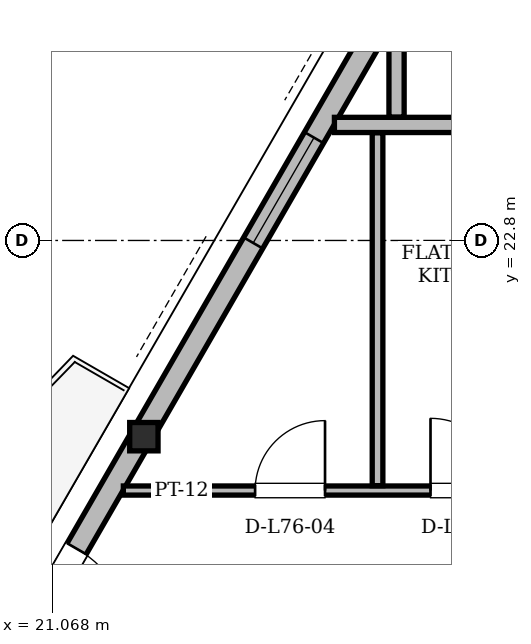
"""IFC4 building model, lengths in metres.
Left out: names, types, materials, properties, quantities, classifications, styles, units other than length and angle.
Written with IfcOpenShell. Run it as: python <this file> out.ifc"""

import sys

from ifc_helpers import new_model, si_unit, direction, frame, frame_2d, origin, origin_2d, place, context, subcontext, project, spatial, rectangle, i_section, extrude, element, fill, save


model = new_model("IFC4")
c1 = context("Model", 3, precision=1e-05, world=origin(), true_north=direction((0.0, 1.0)))
c2 = subcontext(c1, "Body", "Model", "MODEL_VIEW")
j1 = project(units=[si_unit("LENGTHUNIT", "METRE"), si_unit("PLANEANGLEUNIT", "RADIAN")], contexts=[c1])
p1 = place(None, origin())
s1 = spatial("IfcSite", under=j1, at=p1, CompositionType="ELEMENT")
p2 = place(p1, origin())
s2 = spatial("IfcBuilding", under=s1, at=p2, CompositionType="ELEMENT")
p3 = place(p2, frame((0.0, 0.0, 288.9)))
s3 = spatial("IfcBuildingStorey", under=s2, at=p3, CompositionType="ELEMENT", Elevation=288.9)
p4 = place(p3, frame((22.253, 20.237, 0.005), z_axis=(0.01160691126, -0.00941100913, 0.999888350026), x_axis=(0.629801958421, 0.77675574872, 0.0)))
e1 = element("IfcColumn", 1, at=p4, inside=s3, PredefinedType="COLUMN", context=c2, shape_type="SweptSolid", body=[
    extrude(i_section(OverallWidth=0.373, OverallDepth=0.373, WebThickness=0.016, FlangeThickness=0.026, at=origin_2d()), origin(), (0.0, 0.0, 1.0), 3.891),
])
p5 = place(p3, frame((35.387, 42.986, 0.0), z_axis=(0.0, 0.0, 1.0), x_axis=(-0.499995967686, -0.86602773183, 0.0)))
e2 = element("IfcWall", 2, at=p5, inside=s3, PredefinedType="SOLIDWALL", context=c2, shape_type="SweptSolid", body=[
    extrude(rectangle(XDim=37.526, YDim=0.29, at=frame_2d((18.763, 0.0))), origin(), (0.0, 0.0, 1.0), 3.058),
])
p6 = place(p5, frame((3.74, 0.0, 0.0)))
e3 = element("IfcOpeningElement", 3, at=p6, cuts=e2, PredefinedType="OPENING", context=c2, shape_type="SweptSolid", body=[
    extrude(rectangle(XDim=1.3, YDim=2.2, at=frame_2d((0.65, 1.1))), frame((0.0, 0.145, 0.0), z_axis=(0.0, -1.0, 0.0), x_axis=(1.0, 0.0, 0.0)), (0.0, 0.0, 1.0), 0.29),
])
p7 = place(p5, frame((27.991, 0.0, 0.0)))
e4 = element("IfcOpeningElement", 4, at=p7, cuts=e2, PredefinedType="OPENING", context=c2, shape_type="SweptSolid", body=[
    extrude(rectangle(XDim=1.5, YDim=2.2, at=frame_2d((0.75, 1.1))), frame((0.0, 0.145, 0.0), z_axis=(0.0, -1.0, 0.0), x_axis=(1.0, 0.0, 0.0)), (0.0, 0.0, 1.0), 0.29),
])
p8 = place(p5, frame((35.454, 0.0, 0.85)))
e5 = element("IfcOpeningElement", 5, at=p8, cuts=e2, PredefinedType="OPENING", context=c2, shape_type="SweptSolid", body=[
    extrude(rectangle(XDim=1.2, YDim=1.48, at=frame_2d((0.6, 0.74))), frame((0.0, 0.145, 0.0), z_axis=(0.0, -1.0, 0.0), x_axis=(1.0, 0.0, 0.0)), (0.0, 0.0, 1.0), 0.29),
])
p9 = place(p5, frame((33.674, 0.0, 0.85)))
e6 = element("IfcOpeningElement", 6, at=p9, cuts=e2, PredefinedType="OPENING", context=c2, shape_type="SweptSolid", body=[
    extrude(rectangle(XDim=1.2, YDim=1.48, at=frame_2d((0.6, 0.74))), frame((0.0, 0.145, 0.0), z_axis=(0.0, -1.0, 0.0), x_axis=(1.0, 0.0, 0.0)), (0.0, 0.0, 1.0), 0.29),
])
p10 = place(p5, frame((21.746, 0.0, 0.85)))
e7 = element("IfcOpeningElement", 7, at=p10, cuts=e2, PredefinedType="OPENING", context=c2, shape_type="SweptSolid", body=[
    extrude(rectangle(XDim=1.6, YDim=1.7, at=frame_2d((0.8, 0.85))), frame((0.0, 0.145, 0.0), z_axis=(0.0, -1.0, 0.0), x_axis=(1.0, 0.0, 0.0)), (0.0, 0.0, 1.0), 0.29),
])
p11 = place(p5, frame((8.642, 0.0, 0.85)))
e8 = element("IfcOpeningElement", 8, at=p11, cuts=e2, PredefinedType="OPENING", context=c2, shape_type="SweptSolid", body=[
    extrude(rectangle(XDim=1.2, YDim=1.48, at=frame_2d((0.6, 0.74))), frame((0.0, 0.145, 0.0), z_axis=(0.0, -1.0, 0.0), x_axis=(1.0, 0.0, 0.0)), (0.0, 0.0, 1.0), 0.29),
])
p12 = place(p5, frame((16.523, 0.0, 0.85)))
e9 = element("IfcOpeningElement", 9, at=p12, cuts=e2, PredefinedType="OPENING", context=c2, shape_type="SweptSolid", body=[
    extrude(rectangle(XDim=1.8, YDim=1.75, at=frame_2d((0.9, 0.875))), frame((0.0, 0.145, 0.0), z_axis=(0.0, -1.0, 0.0), x_axis=(1.0, 0.0, 0.0)), (0.0, 0.0, 1.0), 0.29),
])
p13 = place(p5, frame((6.715, 0.0, 0.85)))
e10 = element("IfcOpeningElement", 10, at=p13, cuts=e2, PredefinedType="OPENING", context=c2, shape_type="SweptSolid", body=[
    extrude(rectangle(XDim=1.2, YDim=1.48, at=frame_2d((0.6, 0.74))), frame((0.0, 0.145, 0.0), z_axis=(0.0, -1.0, 0.0), x_axis=(1.0, 0.0, 0.0)), (0.0, 0.0, 1.0), 0.29),
])
p14 = place(p5, frame((1.125, 0.0, 0.85)))
e11 = element("IfcOpeningElement", 11, at=p14, cuts=e2, PredefinedType="OPENING", context=c2, shape_type="SweptSolid", body=[
    extrude(rectangle(XDim=1.2, YDim=1.48, at=frame_2d((0.6, 0.74))), frame((0.0, 0.145, 0.0), z_axis=(0.0, -1.0, 0.0), x_axis=(1.0, 0.0, 0.0)), (0.0, 0.0, 1.0), 0.29),
])
p15 = place(p3, frame((22.006, 19.51, 0.0), z_axis=(0.0, 0.0, 1.0), x_axis=(1.0, 0.0, 0.0)))
e12 = element("IfcWall", 12, at=p15, inside=s3, PredefinedType="PARTITIONING", context=c2, shape_type="SweptSolid", body=[
    extrude(rectangle(XDim=7.63, YDim=0.12, at=frame_2d((3.815, 0.0))), origin(), (0.0, 0.0, 1.0), 2.82),
])
p16 = place(p15, frame((1.734, 0.0, 0.0)))
e13 = element("IfcOpeningElement", 13, at=p16, cuts=e12, PredefinedType="OPENING", context=c2, shape_type="SweptSolid", body=[
    extrude(rectangle(XDim=0.92, YDim=2.12, at=frame_2d((0.46, 1.06))), frame((0.0, 0.06, 0.0), z_axis=(0.0, -1.0, 0.0), x_axis=(1.0, 0.0, 0.0)), (0.0, 0.0, 1.0), 0.12),
])
p17 = place(p15, frame((4.042, 0.0, 0.0)))
e14 = element("IfcOpeningElement", 14, at=p17, cuts=e12, PredefinedType="OPENING", context=c2, shape_type="SweptSolid", body=[
    extrude(rectangle(XDim=0.95, YDim=2.1, at=frame_2d((0.475, 1.05))), frame((0.0, 0.06, 0.0), z_axis=(0.0, -1.0, 0.0), x_axis=(1.0, 0.0, 0.0)), (0.0, 0.0, 1.0), 0.12),
])
p18 = place(p15, frame((6.205, 0.0, 0.0)))
e15 = element("IfcOpeningElement", 15, at=p18, cuts=e12, PredefinedType="OPENING", context=c2, shape_type="SweptSolid", body=[
    extrude(rectangle(XDim=0.88, YDim=2.08, at=frame_2d((0.44, 1.04))), frame((0.0, 0.06, 0.0), z_axis=(0.0, -1.0, 0.0), x_axis=(1.0, 0.0, 0.0)), (0.0, 0.0, 1.0), 0.12),
])
p19 = place(p3, frame((24.783, 24.32, 0.0), z_axis=(0.0, 0.0, 1.0), x_axis=(1.0, 0.0, 0.0)))
e16 = element("IfcWall", 16, at=p19, inside=s3, PredefinedType="PARTITIONING", context=c2, shape_type="SweptSolid", body=[
    extrude(rectangle(XDim=4.227, YDim=0.2, at=frame_2d((2.114, 0.0))), origin(), (0.0, 0.0, 1.0), 3.68),
])
p20 = place(p3, frame((25.35, 19.574, 0.0), z_axis=(0.0, 0.0, 1.0), x_axis=(0.0, 1.0, 0.0)))
e17 = element("IfcWall", 17, at=p20, inside=s3, PredefinedType="PARTITIONING", context=c2, shape_type="SweptSolid", body=[
    extrude(rectangle(XDim=4.642, YDim=0.14, at=frame_2d((2.321, 0.0))), origin(), (0.0, 0.0, 1.0), 3.68),
])
p21 = place(p3, frame((25.6, 24.424, 0.0), z_axis=(0.0, 0.0, 1.0), x_axis=(0.0, 1.0, 0.0)))
e18 = element("IfcWall", 18, at=p21, inside=s3, PredefinedType="PARTITIONING", context=c2, shape_type="SweptSolid", body=[
    extrude(rectangle(XDim=1.31, YDim=0.2, at=frame_2d((0.655, 0.0))), origin(), (0.0, 0.0, 1.0), 3.058),
])
p22 = place(p7, origin())
e19 = element("IfcDoor", 19, at=p22, inside=s3, OperationType="SINGLE_SWING_RIGHT", PredefinedType="DOOR", context=c2, shape_type="SweptSolid", body=[
    extrude(rectangle(XDim=1.5, YDim=2.2, at=frame_2d((0.75, 1.1))), frame((0.0, 0.025, 0.0), z_axis=(0.0, -1.0, 0.0), x_axis=(1.0, 0.0, 0.0)), (0.0, 0.0, 1.0), 0.05),
])
fill(e4, e19)
p23 = place(p10, origin())
e20 = element("IfcWindow", 20, at=p23, inside=s3, PartitioningType="SINGLE_PANEL", PredefinedType="WINDOW", context=c2, shape_type="SweptSolid", body=[
    extrude(rectangle(XDim=1.6, YDim=1.7, at=frame_2d((0.8, 0.85))), frame((0.0, 0.03, 0.0), z_axis=(0.0, -1.0, 0.0), x_axis=(1.0, 0.0, 0.0)), (0.0, 0.0, 1.0), 0.06),
])
fill(e7, e20)
p24 = place(p16, origin())
e21 = element("IfcDoor", 21, at=p24, inside=s3, OperationType="SINGLE_SWING_RIGHT", PredefinedType="DOOR", context=c2, shape_type="SweptSolid", body=[
    extrude(rectangle(XDim=0.92, YDim=2.12, at=frame_2d((0.46, 1.06))), frame((0.0, 0.025, 0.0), z_axis=(0.0, -1.0, 0.0), x_axis=(1.0, 0.0, 0.0)), (0.0, 0.0, 1.0), 0.05),
])
fill(e13, e21)
p25 = place(p17, origin())
e22 = element("IfcDoor", 22, at=p25, inside=s3, OperationType="SINGLE_SWING_LEFT", PredefinedType="DOOR", context=c2, shape_type="SweptSolid", body=[
    extrude(rectangle(XDim=0.95, YDim=2.1, at=frame_2d((0.475, 1.05))), frame((0.0, 0.025, 0.0), z_axis=(0.0, -1.0, 0.0), x_axis=(1.0, 0.0, 0.0)), (0.0, 0.0, 1.0), 0.05),
])
fill(e14, e22)
save(model, sys.argv[1])
